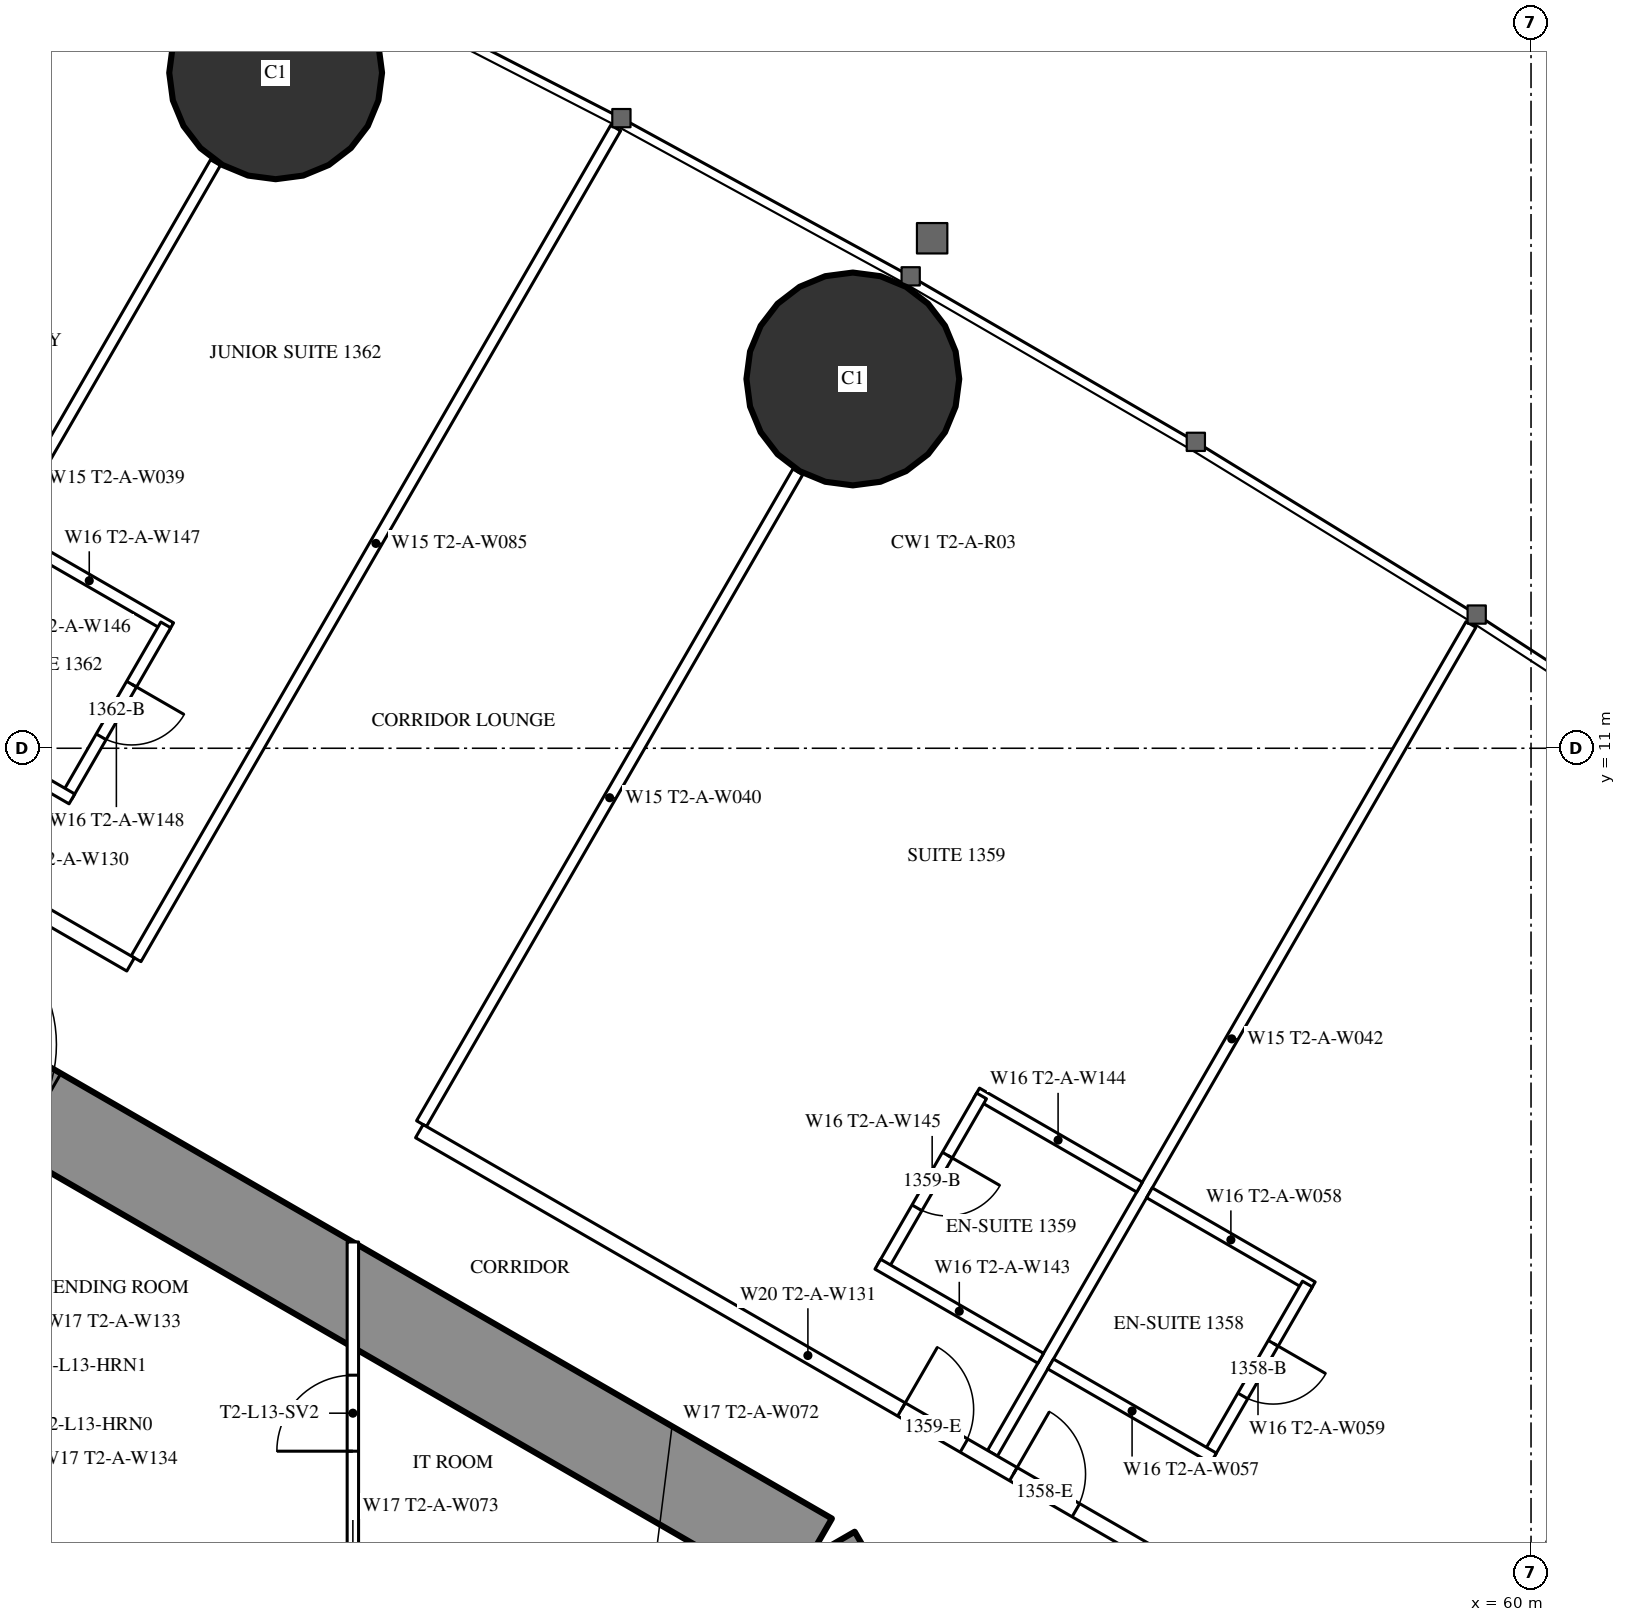
"""IFC4 building model, lengths in metres.
Left out: names, types, materials, properties, quantities, classifications, styles, units other than length and angle.
Written with IfcOpenShell. Run it as: python <this file> out.ifc"""

import sys

from ifc_helpers import new_model, si_unit, direction, frame, frame_2d, origin, origin_2d, place, context, subcontext, project, spatial, rectangle, hollow_circle, extrude, element, fill, save


model = new_model("IFC4")
c1 = context("Model", 3, precision=1e-05, world=origin(), true_north=direction((0.0, 1.0)))
c2 = subcontext(c1, "Body", "Model", "MODEL_VIEW")
j1 = project(units=[si_unit("LENGTHUNIT", "METRE"), si_unit("PLANEANGLEUNIT", "RADIAN")], contexts=[c1])
p1 = place(None, origin())
s1 = spatial("IfcSite", under=j1, at=p1, CompositionType="ELEMENT")
p2 = place(p1, origin())
s2 = spatial("IfcBuilding", under=s1, at=p2, CompositionType="ELEMENT")
p3 = place(p2, frame((0.0, 0.0, 53.0)))
s3 = spatial("IfcBuildingStorey", under=s2, at=p3, CompositionType="ELEMENT", Elevation=53.0)
for number, where, z_axis, x_axis in (
    (1, (51.078, 15.858, 0.0), (0.0, 0.0, 1.0), (1.0, 0.0, 0.0)),
    (2, (43.484, 19.886, 0.0), (0.0, 0.0, 1.0), (1.0, 0.0, 0.0)),
):
    element("IfcColumn", number, at=place(p3, frame(where, z_axis=z_axis, x_axis=x_axis)), inside=s3, PredefinedType="COLUMN", context=c2, shape_type="SweptSolid", body=[
        extrude(hollow_circle(Radius=1.4, WallThickness=0.12, at=origin_2d()), origin(), (0.0, 0.0, 1.0), 3.5),
    ])
p4 = place(p3, frame((61.5, 0.0, 0.0), z_axis=(0.0, 0.0, 1.0), x_axis=(1.0, 0.0, 0.0)))
e3 = element("IfcColumn", 3, at=p4, inside=s3, PredefinedType="COLUMN", context=c2, shape_type="SweptSolid", body=[
    extrude(hollow_circle(Radius=1.4, WallThickness=0.1, at=origin_2d()), origin(), (0.0, 0.0, 1.0), 3.5),
])
p5 = place(p3, frame((27.2, -13.8, 0.0), z_axis=(0.0, 0.0, 1.0), x_axis=(0.866027159892, 0.499996958321, 0.0)))
e4 = element("IfcWall", 4, at=p5, inside=s3, PredefinedType="SHEAR", context=c2, shape_type="SweptSolid", body=[
    extrude(rectangle(XDim=27.947, YDim=1.2, at=frame_2d((13.973, 0.0))), origin(), (0.0, 0.0, 1.0), 3.5),
])
p6 = place(p5, frame((4.6, 0.0, 0.0)))
e5 = element("IfcOpeningElement", 5, at=p6, cuts=e4, PredefinedType="OPENING", context=c2, shape_type="SweptSolid", body=[
    extrude(rectangle(XDim=1.0, YDim=2.2, at=frame_2d((0.5, 1.1))), frame((0.0, 0.61, 0.0), z_axis=(0.0, -1.0, 0.0), x_axis=(1.0, 0.0, 0.0)), (0.0, 0.0, 1.0), 1.22),
])
p7 = place(p5, frame((13.395, 0.0, 0.0)))
e6 = element("IfcOpeningElement", 6, at=p7, cuts=e4, PredefinedType="OPENING", context=c2, shape_type="SweptSolid", body=[
    extrude(rectangle(XDim=1.8, YDim=2.2, at=frame_2d((0.9, 1.1))), frame((0.0, 0.61, 0.0), z_axis=(0.0, -1.0, 0.0), x_axis=(1.0, 0.0, 0.0)), (0.0, 0.0, 1.0), 1.22),
])
p8 = place(p3, frame((27.2, 13.8, 0.0), z_axis=(0.0, 0.0, 1.0), x_axis=(0.866024515034, -0.500001539357, 0.0)))
e7 = element("IfcWall", 7, at=p8, inside=s3, PredefinedType="SHEAR", context=c2, shape_type="SweptSolid", body=[
    extrude(rectangle(XDim=26.907, YDim=1.2, at=frame_2d((13.454, 0.0))), origin(), (0.0, 0.0, 1.0), 3.5),
])
p9 = place(p8, frame((4.6, 0.0, 0.0)))
e8 = element("IfcOpeningElement", 8, at=p9, cuts=e7, PredefinedType="OPENING", context=c2, shape_type="SweptSolid", body=[
    extrude(rectangle(XDim=1.0, YDim=2.2, at=frame_2d((0.5, 1.1))), frame((0.0, 0.61, 0.0), z_axis=(0.0, -1.0, 0.0), x_axis=(1.0, 0.0, 0.0)), (0.0, 0.0, 1.0), 1.22),
])
p10 = place(p8, frame((13.395, 0.0, 0.0)))
e9 = element("IfcOpeningElement", 9, at=p10, cuts=e7, PredefinedType="OPENING", context=c2, shape_type="SweptSolid", body=[
    extrude(rectangle(XDim=1.8, YDim=2.2, at=frame_2d((0.9, 1.1))), frame((0.0, 0.61, 0.0), z_axis=(0.0, -1.0, 0.0), x_axis=(1.0, 0.0, 0.0)), (0.0, 0.0, 1.0), 1.22),
])
p11 = place(p3, frame((37.895, 10.396, 0.0), z_axis=(0.0, 0.0, 1.0), x_axis=(0.499995616528, 0.866027934568, 0.0)))
e10 = element("IfcWall", 10, at=p11, inside=s3, PredefinedType="PARTITIONING", context=c2, shape_type="SweptSolid", body=[
    extrude(rectangle(XDim=9.593, YDim=0.15, at=frame_2d((4.797, 0.0))), origin(), (0.0, 0.0, 1.0), 2.25),
])
p12 = place(p3, frame((41.647, 8.23, 0.0), z_axis=(0.0, 0.0, 1.0), x_axis=(0.49998590462, 0.866033541603, 0.0)))
e11 = element("IfcWall", 11, at=p12, inside=s3, PredefinedType="PARTITIONING", context=c2, shape_type="SweptSolid", body=[
    extrude(rectangle(XDim=12.621, YDim=0.15, at=frame_2d((6.311, 0.0))), origin(), (0.0, 0.0, 1.0), 3.25),
])
p13 = place(p3, frame((45.403, 6.062, 0.0), z_axis=(0.0, 0.0, 1.0), x_axis=(0.500013434677, 0.866017647131, 0.0)))
e12 = element("IfcWall", 12, at=p13, inside=s3, PredefinedType="PARTITIONING", context=c2, shape_type="SweptSolid", body=[
    extrude(rectangle(XDim=9.902, YDim=0.15, at=frame_2d((4.951, 0.0))), origin(), (0.0, 0.0, 1.0), 2.25),
])
p14 = place(p3, frame((52.915, 1.725, 0.0), z_axis=(0.0, 0.0, 1.0), x_axis=(0.499997163113, 0.866027041656, 0.0)))
e13 = element("IfcWall", 13, at=p14, inside=s3, PredefinedType="PARTITIONING", context=c2, shape_type="SweptSolid", body=[
    extrude(rectangle(XDim=12.591, YDim=0.15, at=frame_2d((6.295, 0.0))), origin(), (0.0, 0.0, 1.0), 3.25),
])
p15 = place(p3, frame((36.834, 10.894, 0.0), z_axis=(0.0, 0.0, 1.0), x_axis=(0.866031136856, -0.499990069898, 0.0)))
e14 = element("IfcWall", 14, at=p15, inside=s3, PredefinedType="PARTITIONING", context=c2, shape_type="SweptSolid", body=[
    extrude(rectangle(XDim=5.475, YDim=0.2, at=frame_2d((2.738, 0.0))), origin(), (0.0, 0.0, 1.0), 3.25),
])
p16 = place(p15, frame((1.542, 0.0, 0.0)))
e15 = element("IfcOpeningElement", 15, at=p16, cuts=e14, PredefinedType="OPENING", context=c2, shape_type="SweptSolid", body=[
    extrude(rectangle(XDim=0.95, YDim=2.2, at=frame_2d((0.475, 1.1))), frame((0.0, 0.11, 0.0), z_axis=(0.0, -1.0, 0.0), x_axis=(1.0, 0.0, 0.0)), (0.0, 0.0, 1.0), 0.22),
])
p17 = place(p15, frame((0.246, 0.0, 0.0)))
e16 = element("IfcOpeningElement", 16, at=p17, cuts=e14, PredefinedType="OPENING", context=c2, shape_type="SweptSolid", body=[
    extrude(rectangle(XDim=0.9, YDim=2.2, at=frame_2d((0.45, 1.1))), frame((0.0, 0.11, 0.0), z_axis=(0.0, -1.0, 0.0), x_axis=(1.0, 0.0, 0.0)), (0.0, 0.0, 1.0), 0.22),
])
p18 = place(p3, frame((45.375, 5.963, 0.0), z_axis=(0.0, 0.0, 1.0), x_axis=(0.86603164725, -0.499989185844, 0.0)))
e17 = element("IfcWall", 17, at=p18, inside=s3, PredefinedType="PARTITIONING", context=c2, shape_type="SweptSolid", body=[
    extrude(rectangle(XDim=11.805, YDim=0.2, at=frame_2d((5.903, 0.0))), origin(), (0.0, 0.0, 1.0), 3.25),
])
p19 = place(p18, frame((9.024, 0.0, 0.0)))
e18 = element("IfcOpeningElement", 18, at=p19, cuts=e17, PredefinedType="OPENING", context=c2, shape_type="SweptSolid", body=[
    extrude(rectangle(XDim=0.95, YDim=2.2, at=frame_2d((0.475, 1.1))), frame((0.0, 0.11, 0.0), z_axis=(0.0, -1.0, 0.0), x_axis=(1.0, 0.0, 0.0)), (0.0, 0.0, 1.0), 0.22),
])
p20 = place(p18, frame((7.324, 0.0, 0.0)))
e19 = element("IfcOpeningElement", 19, at=p20, cuts=e17, PredefinedType="OPENING", context=c2, shape_type="SweptSolid", body=[
    extrude(rectangle(XDim=0.95, YDim=2.2, at=frame_2d((0.475, 1.1))), frame((0.0, 0.11, 0.0), z_axis=(0.0, -1.0, 0.0), x_axis=(1.0, 0.0, 0.0)), (0.0, 0.0, 1.0), 0.22),
])
p21 = place(p3, frame((54.98, 5.151, 0.0), z_axis=(0.0, 0.0, 1.0), x_axis=(0.86604923931, -0.499958713387, 0.0)))
e20 = element("IfcWall", 20, at=p21, inside=s3, PredefinedType="PARTITIONING", context=c2, shape_type="SweptSolid", body=[
    extrude(rectangle(XDim=2.475, YDim=0.15, at=frame_2d((1.237, 0.0))), origin(), (0.0, 0.0, 1.0), 3.25),
])
p22 = place(p3, frame((55.758, 1.7, 0.0), z_axis=(0.0, 0.0, 1.0), x_axis=(0.500006934395, 0.866021400173, 0.0)))
e21 = element("IfcWall", 21, at=p22, inside=s3, PredefinedType="PARTITIONING", context=c2, shape_type="SweptSolid", body=[
    extrude(rectangle(XDim=2.6, YDim=0.15, at=frame_2d((1.3, 0.0))), origin(), (0.0, 0.0, 1.0), 3.25),
])
p23 = place(p22, frame((0.9, 0.0, 0.0)))
e22 = element("IfcOpeningElement", 22, at=p23, cuts=e21, PredefinedType="OPENING", context=c2, shape_type="SweptSolid", body=[
    extrude(rectangle(XDim=0.8, YDim=2.2, at=frame_2d((0.4, 1.1))), frame((0.0, 0.085, 0.0), z_axis=(0.0, -1.0, 0.0), x_axis=(1.0, 0.0, 0.0)), (0.0, 0.0, 1.0), 0.17),
])
for number, where, z_axis, x_axis in (
    (23, (53.68, 2.9, 0.0), (0.0, 0.0, 1.0), (0.866, -0.5, 0.0)),
    (24, (52.706, 6.464, 0.0), (0.0, 0.0, 1.0), (0.866, -0.5, 0.0)),
):
    element("IfcWall", number, at=place(p3, frame(where, z_axis=z_axis, x_axis=x_axis)), inside=s3, PredefinedType="PARTITIONING", context=c2, shape_type="SweptSolid", body=[
        extrude(rectangle(XDim=2.475, YDim=0.15, at=frame_2d((1.237, 0.0))), origin(), (0.0, 0.0, 1.0), 3.25),
    ])
p24 = place(p3, frame((51.471, 4.175, 0.0), z_axis=(0.0, 0.0, 1.0), x_axis=(0.500006934395, 0.866021400173, 0.0)))
e25 = element("IfcWall", 25, at=p24, inside=s3, PredefinedType="PARTITIONING", context=c2, shape_type="SweptSolid", body=[
    extrude(rectangle(XDim=2.6, YDim=0.15, at=frame_2d((1.3, 0.0))), origin(), (0.0, 0.0, 1.0), 3.25),
])
p25 = place(p24, frame((0.9, 0.0, 0.0)))
e26 = element("IfcOpeningElement", 26, at=p25, cuts=e25, PredefinedType="OPENING", context=c2, shape_type="SweptSolid", body=[
    extrude(rectangle(XDim=0.8, YDim=2.2, at=frame_2d((0.4, 1.1))), frame((0.0, 0.085, 0.0), z_axis=(0.0, -1.0, 0.0), x_axis=(1.0, 0.0, 0.0)), (0.0, 0.0, 1.0), 0.17),
])
p26 = place(p3, frame((51.406, 4.212, 0.0), z_axis=(0.0, 0.0, 1.0), x_axis=(0.866031185235, -0.4999899861, 0.0)))
e27 = element("IfcWall", 27, at=p26, inside=s3, PredefinedType="PARTITIONING", context=c2, shape_type="SweptSolid", body=[
    extrude(rectangle(XDim=2.475, YDim=0.15, at=frame_2d((1.238, 0.0))), origin(), (0.0, 0.0, 1.0), 3.25),
])
p27 = place(p3, frame((39.96, 13.823, 0.0), z_axis=(0.0, 0.0, 1.0), x_axis=(0.866006523861, -0.500032699561, 0.0)))
e28 = element("IfcWall", 28, at=p27, inside=s3, PredefinedType="PARTITIONING", context=c2, shape_type="SweptSolid", body=[
    extrude(rectangle(XDim=2.475, YDim=0.15, at=frame_2d((1.237, 0.0))), origin(), (0.0, 0.0, 1.0), 3.25),
])
p28 = place(p3, frame((40.739, 10.371, 0.0), z_axis=(0.0, 0.0, 1.0), x_axis=(0.500006934395, 0.866021400173, 0.0)))
e29 = element("IfcWall", 29, at=p28, inside=s3, PredefinedType="PARTITIONING", context=c2, shape_type="SweptSolid", body=[
    extrude(rectangle(XDim=2.6, YDim=0.15, at=frame_2d((1.3, 0.0))), origin(), (0.0, 0.0, 1.0), 3.25),
])
p29 = place(p28, frame((0.9, 0.0, 0.0)))
e30 = element("IfcOpeningElement", 30, at=p29, cuts=e29, PredefinedType="OPENING", context=c2, shape_type="SweptSolid", body=[
    extrude(rectangle(XDim=0.8, YDim=2.2, at=frame_2d((0.4, 1.1))), frame((0.0, 0.085, 0.0), z_axis=(0.0, -1.0, 0.0), x_axis=(1.0, 0.0, 0.0)), (0.0, 0.0, 1.0), 0.17),
])
p30 = place(p3, frame((38.66, 11.571, 0.0), z_axis=(0.0, 0.0, 1.0), x_axis=(0.866006523861, -0.500032699561, 0.0)))
e31 = element("IfcWall", 31, at=p30, inside=s3, PredefinedType="PARTITIONING", context=c2, shape_type="SweptSolid", body=[
    extrude(rectangle(XDim=2.475, YDim=0.15, at=frame_2d((1.237, 0.0))), origin(), (0.0, 0.0, 1.0), 3.25),
])
p31 = place(p3, frame((44.5, -4.505, 0.0), z_axis=(0.0, 0.0, 1.0), x_axis=(0.0, 1.0, 0.0)))
e32 = element("IfcWall", 32, at=p31, inside=s3, PredefinedType="PARTITIONING", context=c2, shape_type="SweptSolid", body=[
    extrude(rectangle(XDim=9.009, YDim=0.15, at=frame_2d((4.505, 0.0))), origin(), (0.0, 0.0, 1.0), 2.45),
])
p32 = place(p31, frame((1.752, 0.0, 0.0)))
e33 = element("IfcOpeningElement", 33, at=p32, cuts=e32, PredefinedType="OPENING", context=c2, shape_type="SweptSolid", body=[
    extrude(rectangle(XDim=1.0, YDim=2.2, at=frame_2d((0.5, 1.1))), frame((0.0, 0.085, 0.0), z_axis=(0.0, -1.0, 0.0), x_axis=(1.0, 0.0, 0.0)), (0.0, 0.0, 1.0), 0.17),
])
p33 = place(p31, frame((6.257, 0.0, 0.0)))
e34 = element("IfcOpeningElement", 34, at=p33, cuts=e32, PredefinedType="OPENING", context=c2, shape_type="SweptSolid", body=[
    extrude(rectangle(XDim=1.0, YDim=2.2, at=frame_2d((0.5, 1.1))), frame((0.0, 0.085, 0.0), z_axis=(0.0, -1.0, 0.0), x_axis=(1.0, 0.0, 0.0)), (0.0, 0.0, 1.0), 0.17),
])
p34 = place(p23, origin())
e35 = element("IfcDoor", 35, at=p34, inside=s3, OperationType="SINGLE_SWING_RIGHT", PredefinedType="DOOR", context=c2, shape_type="SweptSolid", body=[
    extrude(rectangle(XDim=0.8, YDim=2.2, at=frame_2d((0.4, 1.1))), frame((0.0, 0.025, 0.0), z_axis=(0.0, -1.0, 0.0), x_axis=(1.0, 0.0, 0.0)), (0.0, 0.0, 1.0), 0.05),
])
fill(e22, e35)
p35 = place(p19, origin())
e36 = element("IfcDoor", 36, at=p35, inside=s3, OperationType="SINGLE_SWING_LEFT", PredefinedType="DOOR", context=c2, shape_type="SweptSolid", body=[
    extrude(rectangle(XDim=0.95, YDim=2.2, at=frame_2d((0.475, 1.1))), frame((0.0, 0.025, 0.0), z_axis=(0.0, -1.0, 0.0), x_axis=(1.0, 0.0, 0.0)), (0.0, 0.0, 1.0), 0.05),
])
fill(e18, e36)
p36 = place(p25, origin())
e37 = element("IfcDoor", 37, at=p36, inside=s3, OperationType="SINGLE_SWING_RIGHT", PredefinedType="DOOR", context=c2, shape_type="SweptSolid", body=[
    extrude(rectangle(XDim=0.8, YDim=2.2, at=frame_2d((0.4, 1.1))), frame((0.0, 0.025, 0.0), z_axis=(0.0, -1.0, 0.0), x_axis=(1.0, 0.0, 0.0)), (0.0, 0.0, 1.0), 0.05),
])
fill(e26, e37)
p37 = place(p20, origin())
e38 = element("IfcDoor", 38, at=p37, inside=s3, OperationType="SINGLE_SWING_LEFT", PredefinedType="DOOR", context=c2, shape_type="SweptSolid", body=[
    extrude(rectangle(XDim=0.95, YDim=2.2, at=frame_2d((0.475, 1.1))), frame((0.0, 0.025, 0.0), z_axis=(0.0, -1.0, 0.0), x_axis=(1.0, 0.0, 0.0)), (0.0, 0.0, 1.0), 0.05),
])
fill(e19, e38)
p38 = place(p29, origin())
e39 = element("IfcDoor", 39, at=p38, inside=s3, OperationType="SINGLE_SWING_RIGHT", PredefinedType="DOOR", context=c2, shape_type="SweptSolid", body=[
    extrude(rectangle(XDim=0.8, YDim=2.2, at=frame_2d((0.4, 1.1))), frame((0.0, 0.025, 0.0), z_axis=(0.0, -1.0, 0.0), x_axis=(1.0, 0.0, 0.0)), (0.0, 0.0, 1.0), 0.05),
])
fill(e30, e39)
p39 = place(p33, origin())
e40 = element("IfcDoor", 40, at=p39, inside=s3, OperationType="SINGLE_SWING_LEFT", PredefinedType="DOOR", context=c2, shape_type="SweptSolid", body=[
    extrude(rectangle(XDim=1.0, YDim=2.2, at=frame_2d((0.5, 1.1))), frame((0.0, 0.025, 0.0), z_axis=(0.0, -1.0, 0.0), x_axis=(1.0, 0.0, 0.0)), (0.0, 0.0, 1.0), 0.05),
])
fill(e34, e40)
save(model, sys.argv[1])
